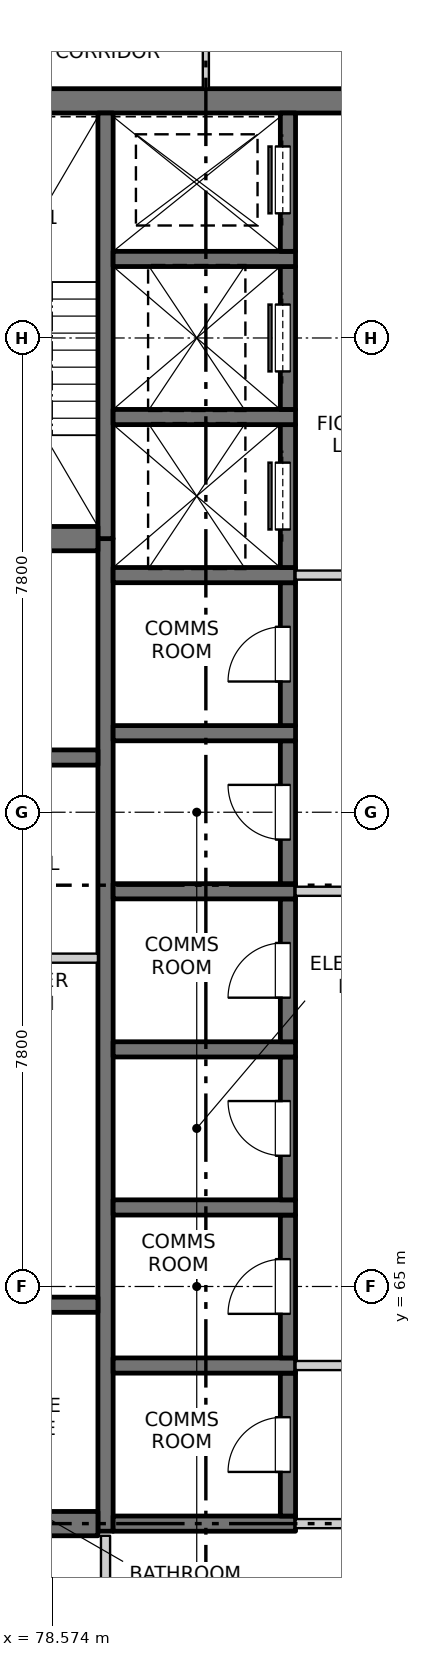
"""IFC4 building model, lengths in metres.
Left out: names, types, materials, properties, quantities, classifications, styles, units other than length and angle.
Written with IfcOpenShell. Run it as: python <this file> out.ifc"""

import sys

from ifc_helpers import new_model, si_unit, direction, frame, frame_2d, origin, place, context, subcontext, project, spatial, rectangle, extrude, element, fill, save


model = new_model("IFC4")
c1 = context("Model", 3, precision=1e-05, world=origin(), true_north=direction((0.0, 1.0)))
c2 = subcontext(c1, "Body", "Model", "MODEL_VIEW")
j1 = project(units=[si_unit("LENGTHUNIT", "METRE"), si_unit("PLANEANGLEUNIT", "RADIAN")], contexts=[c1])
p1 = place(None, origin())
s1 = spatial("IfcSite", under=j1, at=p1, CompositionType="ELEMENT")
p2 = place(p1, origin())
s2 = spatial("IfcBuilding", under=s1, at=p2, CompositionType="ELEMENT")
p3 = place(p2, frame((0.0, 0.0, 234.7)))
s3 = spatial("IfcBuildingStorey", under=s2, at=p3, CompositionType="ELEMENT", Elevation=234.7)
p4 = place(p3, frame((75.45, 84.5, -0.25), z_axis=(0.0, 0.0, 1.0), x_axis=(1.0, 0.0, 0.0)))
e1 = element("IfcWall", 1, at=p4, inside=s3, PredefinedType="SOLIDWALL", context=c2, shape_type="SweptSolid", body=[
    extrude(rectangle(XDim=19.1, YDim=0.4, at=frame_2d((9.55, 0.0))), origin(), (0.0, 0.0, 1.0), 3.4),
])
p5 = place(p3, frame((79.45, 60.975, -0.25), z_axis=(0.0, 0.0, 1.0), x_axis=(0.0, 1.0, 0.0)))
e2 = element("IfcWall", 2, at=p5, inside=s3, PredefinedType="SOLIDWALL", context=c2, shape_type="SweptSolid", body=[
    extrude(rectangle(XDim=16.325, YDim=0.25, at=frame_2d((8.163, 0.0))), origin(), (0.0, 0.0, 1.0), 3.4),
])
p6 = place(p3, frame((79.45, 77.3, -0.25), z_axis=(0.0, 0.0, 1.0), x_axis=(0.0, 1.0, 0.0)))
e3 = element("IfcWall", 3, at=p6, inside=s3, PredefinedType="SOLIDWALL", context=c2, shape_type="SweptSolid", body=[
    extrude(rectangle(XDim=7.0, YDim=0.25, at=frame_2d((3.5, 0.0))), origin(), (0.0, 0.0, 1.0), 3.4),
])
p7 = place(p3, frame((79.575, 61.1, -0.25), z_axis=(0.0, 0.0, 1.0), x_axis=(1.0, 0.0, 0.0)))
e4 = element("IfcWall", 4, at=p7, inside=s3, PredefinedType="SOLIDWALL", context=c2, shape_type="SweptSolid", body=[
    extrude(rectangle(XDim=3.0, YDim=0.25, at=frame_2d((1.5, 0.0))), origin(), (0.0, 0.0, 1.0), 3.4),
])
p8 = place(p3, frame((82.45, 61.225, -0.25), z_axis=(0.0, 0.0, 1.0), x_axis=(0.0, 1.0, 0.0)))
e5 = element("IfcWall", 5, at=p8, inside=s3, PredefinedType="SOLIDWALL", context=c2, shape_type="SweptSolid", body=[
    extrude(rectangle(XDim=2.35, YDim=0.25, at=frame_2d((1.175, 0.0))), origin(), (0.0, 0.0, 1.0), 3.4),
])
p9 = place(p8, frame((0.725, 0.0, 0.25)))
e6 = element("IfcOpeningElement", 6, at=p9, cuts=e5, PredefinedType="OPENING", context=c2, shape_type="SweptSolid", body=[
    extrude(rectangle(XDim=0.9, YDim=2.1, at=frame_2d((0.45, 1.05))), frame((0.0, 0.135, 0.0), z_axis=(0.0, -1.0, 0.0), x_axis=(1.0, 0.0, 0.0)), (0.0, 0.0, 1.0), 0.27),
])
p10 = place(p3, frame((79.575, 63.7, -0.25), z_axis=(0.0, 0.0, 1.0), x_axis=(1.0, 0.0, 0.0)))
e7 = element("IfcWall", 7, at=p10, inside=s3, PredefinedType="SOLIDWALL", context=c2, shape_type="SweptSolid", body=[
    extrude(rectangle(XDim=3.0, YDim=0.25, at=frame_2d((1.5, 0.0))), origin(), (0.0, 0.0, 1.0), 3.4),
])
p11 = place(p3, frame((82.45, 63.825, -0.25), z_axis=(0.0, 0.0, 1.0), x_axis=(0.0, 1.0, 0.0)))
e8 = element("IfcWall", 8, at=p11, inside=s3, PredefinedType="SOLIDWALL", context=c2, shape_type="SweptSolid", body=[
    extrude(rectangle(XDim=2.35, YDim=0.25, at=frame_2d((1.175, 0.0))), origin(), (0.0, 0.0, 1.0), 3.4),
])
p12 = place(p11, frame((0.725, 0.0, 0.25)))
e9 = element("IfcOpeningElement", 9, at=p12, cuts=e8, PredefinedType="OPENING", context=c2, shape_type="SweptSolid", body=[
    extrude(rectangle(XDim=0.9, YDim=2.1, at=frame_2d((0.45, 1.05))), frame((0.0, 0.135, 0.0), z_axis=(0.0, -1.0, 0.0), x_axis=(1.0, 0.0, 0.0)), (0.0, 0.0, 1.0), 0.27),
])
p13 = place(p3, frame((79.575, 66.3, -0.25), z_axis=(0.0, 0.0, 1.0), x_axis=(1.0, 0.0, 0.0)))
e10 = element("IfcWall", 10, at=p13, inside=s3, PredefinedType="SOLIDWALL", context=c2, shape_type="SweptSolid", body=[
    extrude(rectangle(XDim=3.0, YDim=0.25, at=frame_2d((1.5, 0.0))), origin(), (0.0, 0.0, 1.0), 3.4),
])
p14 = place(p3, frame((82.45, 66.425, -0.25), z_axis=(0.0, 0.0, 1.0), x_axis=(0.0, 1.0, 0.0)))
e11 = element("IfcWall", 11, at=p14, inside=s3, PredefinedType="SOLIDWALL", context=c2, shape_type="SweptSolid", body=[
    extrude(rectangle(XDim=2.35, YDim=0.25, at=frame_2d((1.175, 0.0))), origin(), (0.0, 0.0, 1.0), 3.4),
])
p15 = place(p14, frame((0.725, 0.0, 0.25)))
e12 = element("IfcOpeningElement", 12, at=p15, cuts=e11, PredefinedType="OPENING", context=c2, shape_type="SweptSolid", body=[
    extrude(rectangle(XDim=0.9, YDim=2.1, at=frame_2d((0.45, 1.05))), frame((0.0, 0.135, 0.0), z_axis=(0.0, -1.0, 0.0), x_axis=(1.0, 0.0, 0.0)), (0.0, 0.0, 1.0), 0.27),
])
p16 = place(p3, frame((79.575, 68.9, -0.25), z_axis=(0.0, 0.0, 1.0), x_axis=(1.0, 0.0, 0.0)))
e13 = element("IfcWall", 13, at=p16, inside=s3, PredefinedType="SOLIDWALL", context=c2, shape_type="SweptSolid", body=[
    extrude(rectangle(XDim=3.0, YDim=0.25, at=frame_2d((1.5, 0.0))), origin(), (0.0, 0.0, 1.0), 3.4),
])
p17 = place(p3, frame((82.45, 69.025, -0.25), z_axis=(0.0, 0.0, 1.0), x_axis=(0.0, 1.0, 0.0)))
e14 = element("IfcWall", 14, at=p17, inside=s3, PredefinedType="SOLIDWALL", context=c2, shape_type="SweptSolid", body=[
    extrude(rectangle(XDim=2.35, YDim=0.25, at=frame_2d((1.175, 0.0))), origin(), (0.0, 0.0, 1.0), 3.4),
])
p18 = place(p17, frame((0.725, 0.0, 0.25)))
e15 = element("IfcOpeningElement", 15, at=p18, cuts=e14, PredefinedType="OPENING", context=c2, shape_type="SweptSolid", body=[
    extrude(rectangle(XDim=0.9, YDim=2.1, at=frame_2d((0.45, 1.05))), frame((0.0, 0.135, 0.0), z_axis=(0.0, -1.0, 0.0), x_axis=(1.0, 0.0, 0.0)), (0.0, 0.0, 1.0), 0.27),
])
p19 = place(p3, frame((79.575, 71.5, -0.25), z_axis=(0.0, 0.0, 1.0), x_axis=(1.0, 0.0, 0.0)))
e16 = element("IfcWall", 16, at=p19, inside=s3, PredefinedType="SOLIDWALL", context=c2, shape_type="SweptSolid", body=[
    extrude(rectangle(XDim=3.0, YDim=0.25, at=frame_2d((1.5, 0.0))), origin(), (0.0, 0.0, 1.0), 3.4),
])
p20 = place(p3, frame((82.45, 71.625, -0.25), z_axis=(0.0, 0.0, 1.0), x_axis=(0.0, 1.0, 0.0)))
e17 = element("IfcWall", 17, at=p20, inside=s3, PredefinedType="SOLIDWALL", context=c2, shape_type="SweptSolid", body=[
    extrude(rectangle(XDim=2.35, YDim=0.25, at=frame_2d((1.175, 0.0))), origin(), (0.0, 0.0, 1.0), 3.4),
])
p21 = place(p20, frame((0.725, 0.0, 0.25)))
e18 = element("IfcOpeningElement", 18, at=p21, cuts=e17, PredefinedType="OPENING", context=c2, shape_type="SweptSolid", body=[
    extrude(rectangle(XDim=0.9, YDim=2.1, at=frame_2d((0.45, 1.05))), frame((0.0, 0.135, 0.0), z_axis=(0.0, -1.0, 0.0), x_axis=(1.0, 0.0, 0.0)), (0.0, 0.0, 1.0), 0.27),
])
p22 = place(p3, frame((79.575, 74.1, -0.25), z_axis=(0.0, 0.0, 1.0), x_axis=(1.0, 0.0, 0.0)))
e19 = element("IfcWall", 19, at=p22, inside=s3, PredefinedType="SOLIDWALL", context=c2, shape_type="SweptSolid", body=[
    extrude(rectangle(XDim=3.0, YDim=0.25, at=frame_2d((1.5, 0.0))), origin(), (0.0, 0.0, 1.0), 3.4),
])
p23 = place(p3, frame((82.45, 74.225, -0.25), z_axis=(0.0, 0.0, 1.0), x_axis=(0.0, 1.0, 0.0)))
e20 = element("IfcWall", 20, at=p23, inside=s3, PredefinedType="SOLIDWALL", context=c2, shape_type="SweptSolid", body=[
    extrude(rectangle(XDim=2.35, YDim=0.25, at=frame_2d((1.175, 0.0))), origin(), (0.0, 0.0, 1.0), 3.4),
])
p24 = place(p23, frame((0.725, 0.0, 0.25)))
e21 = element("IfcOpeningElement", 21, at=p24, cuts=e20, PredefinedType="OPENING", context=c2, shape_type="SweptSolid", body=[
    extrude(rectangle(XDim=0.9, YDim=2.1, at=frame_2d((0.45, 1.05))), frame((0.0, 0.135, 0.0), z_axis=(0.0, -1.0, 0.0), x_axis=(1.0, 0.0, 0.0)), (0.0, 0.0, 1.0), 0.27),
])
p25 = place(p3, frame((79.575, 76.7, -0.25), z_axis=(0.0, 0.0, 1.0), x_axis=(1.0, 0.0, 0.0)))
e22 = element("IfcWall", 22, at=p25, inside=s3, PredefinedType="SOLIDWALL", context=c2, shape_type="SweptSolid", body=[
    extrude(rectangle(XDim=3.0, YDim=0.25, at=frame_2d((1.5, 0.0))), origin(), (0.0, 0.0, 1.0), 3.4),
])
p26 = place(p3, frame((82.45, 76.825, -0.25), z_axis=(0.0, 0.0, 1.0), x_axis=(0.0, 1.0, 0.0)))
e23 = element("IfcWall", 23, at=p26, inside=s3, PredefinedType="SOLIDWALL", context=c2, shape_type="SweptSolid", body=[
    extrude(rectangle(XDim=2.35, YDim=0.25, at=frame_2d((1.175, 0.0))), origin(), (0.0, 0.0, 1.0), 3.4),
])
p27 = place(p26, frame((0.625, 0.0, 0.25)))
e24 = element("IfcOpeningElement", 24, at=p27, cuts=e23, PredefinedType="OPENING", context=c2, shape_type="SweptSolid", body=[
    extrude(rectangle(XDim=1.1, YDim=2.1, at=frame_2d((0.55, 1.05))), frame((0.0, 0.135, 0.0), z_axis=(0.0, -1.0, 0.0), x_axis=(1.0, 0.0, 0.0)), (0.0, 0.0, 1.0), 0.27),
])
p28 = place(p3, frame((79.575, 79.3, -0.25), z_axis=(0.0, 0.0, 1.0), x_axis=(1.0, 0.0, 0.0)))
e25 = element("IfcWall", 25, at=p28, inside=s3, PredefinedType="SOLIDWALL", context=c2, shape_type="SweptSolid", body=[
    extrude(rectangle(XDim=3.0, YDim=0.25, at=frame_2d((1.5, 0.0))), origin(), (0.0, 0.0, 1.0), 3.4),
])
p29 = place(p3, frame((82.45, 79.425, -0.25), z_axis=(0.0, 0.0, 1.0), x_axis=(0.0, 1.0, 0.0)))
e26 = element("IfcWall", 26, at=p29, inside=s3, PredefinedType="SOLIDWALL", context=c2, shape_type="SweptSolid", body=[
    extrude(rectangle(XDim=2.35, YDim=0.25, at=frame_2d((1.175, 0.0))), origin(), (0.0, 0.0, 1.0), 3.4),
])
p30 = place(p29, frame((0.625, 0.0, 0.25)))
e27 = element("IfcOpeningElement", 27, at=p30, cuts=e26, PredefinedType="OPENING", context=c2, shape_type="SweptSolid", body=[
    extrude(rectangle(XDim=1.1, YDim=2.1, at=frame_2d((0.55, 1.05))), frame((0.0, 0.135, 0.0), z_axis=(0.0, -1.0, 0.0), x_axis=(1.0, 0.0, 0.0)), (0.0, 0.0, 1.0), 0.27),
])
p31 = place(p3, frame((79.575, 81.9, -0.25), z_axis=(0.0, 0.0, 1.0), x_axis=(1.0, 0.0, 0.0)))
e28 = element("IfcWall", 28, at=p31, inside=s3, PredefinedType="SOLIDWALL", context=c2, shape_type="SweptSolid", body=[
    extrude(rectangle(XDim=3.0, YDim=0.25, at=frame_2d((1.5, 0.0))), origin(), (0.0, 0.0, 1.0), 3.4),
])
p32 = place(p3, frame((82.45, 82.025, -0.25), z_axis=(0.0, 0.0, 1.0), x_axis=(0.0, 1.0, 0.0)))
e29 = element("IfcWall", 29, at=p32, inside=s3, PredefinedType="SOLIDWALL", context=c2, shape_type="SweptSolid", body=[
    extrude(rectangle(XDim=2.275, YDim=0.25, at=frame_2d((1.138, 0.0))), origin(), (0.0, 0.0, 1.0), 3.4),
])
p33 = place(p32, frame((0.625, 0.0, 0.25)))
e30 = element("IfcOpeningElement", 30, at=p33, cuts=e29, PredefinedType="OPENING", context=c2, shape_type="SweptSolid", body=[
    extrude(rectangle(XDim=1.1, YDim=2.1, at=frame_2d((0.55, 1.05))), frame((0.0, 0.135, 0.0), z_axis=(0.0, -1.0, 0.0), x_axis=(1.0, 0.0, 0.0)), (0.0, 0.0, 1.0), 0.27),
])
p34 = place(p3, frame((75.45, 61.1, -0.25), z_axis=(0.0, 0.0, 1.0), x_axis=(1.0, 0.0, 0.0)))
e31 = element("IfcWall", 31, at=p34, inside=s3, PredefinedType="SOLIDWALL", context=c2, shape_type="SweptSolid", body=[
    extrude(rectangle(XDim=3.875, YDim=0.4, at=frame_2d((1.938, 0.0))), origin(), (0.0, 0.0, 1.0), 3.4),
])
for number, where, z_axis, x_axis in (
    (32, (75.45, 64.7, -0.25), (0.0, 0.0, 1.0), (1.0, 0.0, 0.0)),
    (33, (75.45, 73.7, -0.25), (0.0, 0.0, 1.0), (1.0, 0.0, 0.0)),
):
    element("IfcWall", number, at=place(p3, frame(where, z_axis=z_axis, x_axis=x_axis)), inside=s3, PredefinedType="SOLIDWALL", context=c2, shape_type="SweptSolid", body=[
        extrude(rectangle(XDim=3.875, YDim=0.25, at=frame_2d((1.938, 0.0))), origin(), (0.0, 0.0, 1.0), 3.4),
    ])
p35 = place(p3, frame((75.45, 77.3, -0.25), z_axis=(0.0, 0.0, 1.0), x_axis=(1.0, 0.0, 0.0)))
e34 = element("IfcWall", 34, at=p35, inside=s3, PredefinedType="SOLIDWALL", context=c2, shape_type="SweptSolid", body=[
    extrude(rectangle(XDim=3.875, YDim=0.4, at=frame_2d((1.938, 0.0))), origin(), (0.0, 0.0, 1.0), 3.4),
])
p36 = place(p3, frame((82.575, 61.1, 0.0), z_axis=(0.0, 0.0, 1.0), x_axis=(1.0, 0.0, 0.0)))
e35 = element("IfcWall", 35, at=p36, inside=s3, PredefinedType="PARTITIONING", context=c2, shape_type="SweptSolid", body=[
    extrude(rectangle(XDim=4.85, YDim=0.15, at=frame_2d((2.425, 0.0))), origin(), (0.0, 0.0, 1.0), 3.15),
])
p37 = place(p36, frame((1.525, 0.0, 0.0)))
e36 = element("IfcOpeningElement", 36, at=p37, cuts=e35, PredefinedType="OPENING", context=c2, shape_type="SweptSolid", body=[
    extrude(rectangle(XDim=1.8, YDim=2.1, at=frame_2d((0.9, 1.05))), frame((0.0, 0.085, 0.0), z_axis=(0.0, -1.0, 0.0), x_axis=(1.0, 0.0, 0.0)), (0.0, 0.0, 1.0), 0.17),
])
p38 = place(p3, frame((82.575, 63.7, 0.0), z_axis=(0.0, 0.0, 1.0), x_axis=(1.0, 0.0, 0.0)))
e37 = element("IfcWall", 37, at=p38, inside=s3, PredefinedType="PARTITIONING", context=c2, shape_type="SweptSolid", body=[
    extrude(rectangle(XDim=4.85, YDim=0.15, at=frame_2d((2.425, 0.0))), origin(), (0.0, 0.0, 1.0), 3.15),
])
p39 = place(p38, frame((1.525, 0.0, 0.0)))
e38 = element("IfcOpeningElement", 38, at=p39, cuts=e37, PredefinedType="OPENING", context=c2, shape_type="SweptSolid", body=[
    extrude(rectangle(XDim=1.8, YDim=2.1, at=frame_2d((0.9, 1.05))), frame((0.0, 0.085, 0.0), z_axis=(0.0, -1.0, 0.0), x_axis=(1.0, 0.0, 0.0)), (0.0, 0.0, 1.0), 0.17),
])
p40 = place(p3, frame((75.45, 70.4, 0.0), z_axis=(0.0, 0.0, 1.0), x_axis=(1.0, 0.0, 0.0)))
e39 = element("IfcWall", 39, at=p40, inside=s3, PredefinedType="PARTITIONING", context=c2, shape_type="SweptSolid", body=[
    extrude(rectangle(XDim=3.875, YDim=0.15, at=frame_2d((1.938, 0.0))), origin(), (0.0, 0.0, 1.0), 3.15),
])
p41 = place(p3, frame((82.575, 71.5, 0.0), z_axis=(0.0, 0.0, 1.0), x_axis=(1.0, 0.0, 0.0)))
e40 = element("IfcWall", 40, at=p41, inside=s3, PredefinedType="PARTITIONING", context=c2, shape_type="SweptSolid", body=[
    extrude(rectangle(XDim=4.85, YDim=0.15, at=frame_2d((2.425, 0.0))), origin(), (0.0, 0.0, 1.0), 3.15),
])
p42 = place(p41, frame((1.525, 0.0, 0.0)))
e41 = element("IfcOpeningElement", 41, at=p42, cuts=e40, PredefinedType="OPENING", context=c2, shape_type="SweptSolid", body=[
    extrude(rectangle(XDim=1.8, YDim=2.1, at=frame_2d((0.9, 1.05))), frame((0.0, 0.085, 0.0), z_axis=(0.0, -1.0, 0.0), x_axis=(1.0, 0.0, 0.0)), (0.0, 0.0, 1.0), 0.17),
])
p43 = place(p3, frame((82.575, 76.7, 0.0), z_axis=(0.0, 0.0, 1.0), x_axis=(1.0, 0.0, 0.0)))
e42 = element("IfcWall", 42, at=p43, inside=s3, PredefinedType="PARTITIONING", context=c2, shape_type="SweptSolid", body=[
    extrude(rectangle(XDim=4.85, YDim=0.15, at=frame_2d((2.425, 0.0))), origin(), (0.0, 0.0, 1.0), 3.15),
])
p44 = place(p43, frame((1.525, 0.0, 0.0)))
e43 = element("IfcOpeningElement", 43, at=p44, cuts=e42, PredefinedType="OPENING", context=c2, shape_type="SweptSolid", body=[
    extrude(rectangle(XDim=1.8, YDim=2.1, at=frame_2d((0.9, 1.05))), frame((0.0, 0.085, 0.0), z_axis=(0.0, -1.0, 0.0), x_axis=(1.0, 0.0, 0.0)), (0.0, 0.0, 1.0), 0.17),
])
p45 = place(p3, frame((79.45, 55.45, 0.0), z_axis=(0.0, 0.0, 1.0), x_axis=(0.0, 1.0, 0.0)))
e44 = element("IfcWall", 44, at=p45, inside=s3, PredefinedType="PARTITIONING", context=c2, shape_type="SweptSolid", body=[
    extrude(rectangle(XDim=5.45, YDim=0.15, at=frame_2d((2.725, 0.0))), origin(), (0.0, 0.0, 1.0), 3.15),
])
p46 = place(p45, frame((2.25, 0.0, 0.0)))
e45 = element("IfcOpeningElement", 45, at=p46, cuts=e44, PredefinedType="OPENING", context=c2, shape_type="SweptSolid", body=[
    extrude(rectangle(XDim=0.9, YDim=2.1, at=frame_2d((0.45, 1.05))), frame((0.0, 0.085, 0.0), z_axis=(0.0, -1.0, 0.0), x_axis=(1.0, 0.0, 0.0)), (0.0, 0.0, 1.0), 0.17),
])
p47 = place(p3, frame((81.1, 84.7, 0.0), z_axis=(0.0, 0.0, 1.0), x_axis=(0.0, 1.0, 0.0)))
e46 = element("IfcWall", 46, at=p47, inside=s3, PredefinedType="PARTITIONING", context=c2, shape_type="SweptSolid", body=[
    extrude(rectangle(XDim=3.4, YDim=0.1, at=frame_2d((1.7, 0.0))), origin(), (0.0, 0.0, 1.0), 3.15),
])
p48 = place(p47, frame((1.3, 0.0, 0.0)))
e47 = element("IfcOpeningElement", 47, at=p48, cuts=e46, PredefinedType="OPENING", context=c2, shape_type="SweptSolid", body=[
    extrude(rectangle(XDim=0.9, YDim=2.1, at=frame_2d((0.45, 1.05))), frame((0.0, 0.06, 0.0), z_axis=(0.0, -1.0, 0.0), x_axis=(1.0, 0.0, 0.0)), (0.0, 0.0, 1.0), 0.12),
])
p49 = place(p9, origin())
e48 = element("IfcDoor", 48, at=p49, inside=s3, OperationType="SINGLE_SWING_LEFT", PredefinedType="DOOR", context=c2, shape_type="SweptSolid", body=[
    extrude(rectangle(XDim=0.9, YDim=2.1, at=frame_2d((0.45, 1.05))), frame((0.0, 0.11, 0.0), z_axis=(0.0, -1.0, 0.0), x_axis=(1.0, 0.0, 0.0)), (0.0, 0.0, 1.0), 0.05),
])
fill(e6, e48)
p50 = place(p12, origin())
e49 = element("IfcDoor", 49, at=p50, inside=s3, OperationType="SINGLE_SWING_LEFT", PredefinedType="DOOR", context=c2, shape_type="SweptSolid", body=[
    extrude(rectangle(XDim=0.9, YDim=2.1, at=frame_2d((0.45, 1.05))), frame((0.0, 0.11, 0.0), z_axis=(0.0, -1.0, 0.0), x_axis=(1.0, 0.0, 0.0)), (0.0, 0.0, 1.0), 0.05),
])
fill(e9, e49)
p51 = place(p15, origin())
e50 = element("IfcDoor", 50, at=p51, inside=s3, OperationType="SINGLE_SWING_RIGHT", PredefinedType="DOOR", context=c2, shape_type="SweptSolid", body=[
    extrude(rectangle(XDim=0.9, YDim=2.1, at=frame_2d((0.45, 1.05))), frame((0.0, 0.11, 0.0), z_axis=(0.0, -1.0, 0.0), x_axis=(1.0, 0.0, 0.0)), (0.0, 0.0, 1.0), 0.05),
])
fill(e12, e50)
p52 = place(p18, origin())
e51 = element("IfcDoor", 51, at=p52, inside=s3, OperationType="SINGLE_SWING_LEFT", PredefinedType="DOOR", context=c2, shape_type="SweptSolid", body=[
    extrude(rectangle(XDim=0.9, YDim=2.1, at=frame_2d((0.45, 1.05))), frame((0.0, 0.11, 0.0), z_axis=(0.0, -1.0, 0.0), x_axis=(1.0, 0.0, 0.0)), (0.0, 0.0, 1.0), 0.05),
])
fill(e15, e51)
p53 = place(p21, origin())
e52 = element("IfcDoor", 52, at=p53, inside=s3, OperationType="SINGLE_SWING_RIGHT", PredefinedType="DOOR", context=c2, shape_type="SweptSolid", body=[
    extrude(rectangle(XDim=0.9, YDim=2.1, at=frame_2d((0.45, 1.05))), frame((0.0, 0.11, 0.0), z_axis=(0.0, -1.0, 0.0), x_axis=(1.0, 0.0, 0.0)), (0.0, 0.0, 1.0), 0.05),
])
fill(e18, e52)
p54 = place(p24, origin())
e53 = element("IfcDoor", 53, at=p54, inside=s3, OperationType="SINGLE_SWING_LEFT", PredefinedType="DOOR", context=c2, shape_type="SweptSolid", body=[
    extrude(rectangle(XDim=0.9, YDim=2.1, at=frame_2d((0.45, 1.05))), frame((0.0, 0.11, 0.0), z_axis=(0.0, -1.0, 0.0), x_axis=(1.0, 0.0, 0.0)), (0.0, 0.0, 1.0), 0.05),
])
fill(e21, e53)
p55 = place(p27, origin())
e54 = element("IfcDoor", 54, at=p55, inside=s3, OperationType="SLIDING_TO_LEFT", PredefinedType="DOOR", context=c2, shape_type="SweptSolid", body=[
    extrude(rectangle(XDim=1.1, YDim=2.1, at=frame_2d((0.55, 1.05))), frame((0.0, 0.11, 0.0), z_axis=(0.0, -1.0, 0.0), x_axis=(1.0, 0.0, 0.0)), (0.0, 0.0, 1.0), 0.05),
])
fill(e24, e54)
p56 = place(p30, origin())
e55 = element("IfcDoor", 55, at=p56, inside=s3, OperationType="SLIDING_TO_LEFT", PredefinedType="DOOR", context=c2, shape_type="SweptSolid", body=[
    extrude(rectangle(XDim=1.1, YDim=2.1, at=frame_2d((0.55, 1.05))), frame((0.0, 0.11, 0.0), z_axis=(0.0, -1.0, 0.0), x_axis=(1.0, 0.0, 0.0)), (0.0, 0.0, 1.0), 0.05),
])
fill(e27, e55)
p57 = place(p33, origin())
e56 = element("IfcDoor", 56, at=p57, inside=s3, OperationType="SLIDING_TO_RIGHT", PredefinedType="DOOR", context=c2, shape_type="SweptSolid", body=[
    extrude(rectangle(XDim=1.1, YDim=2.1, at=frame_2d((0.55, 1.05))), frame((0.0, 0.11, 0.0), z_axis=(0.0, -1.0, 0.0), x_axis=(1.0, 0.0, 0.0)), (0.0, 0.0, 1.0), 0.05),
])
fill(e30, e56)
save(model, sys.argv[1])
